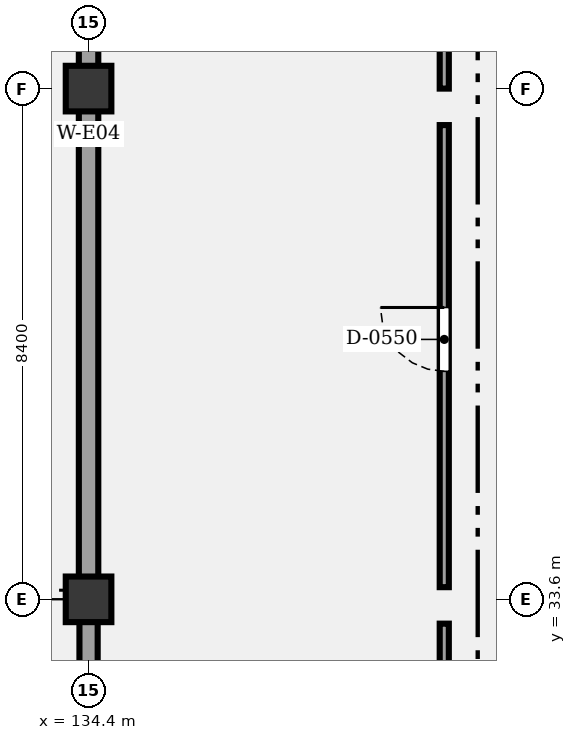
"""IFC4 building model, lengths in metres.
Left out: names, types, materials, properties, quantities, classifications, styles, units other than length and angle.
Written with IfcOpenShell. Run it as: python <this file> out.ifc"""

import sys

from ifc_helpers import new_model, si_unit, direction, frame, frame_2d, origin, origin_2d, place, context, subcontext, project, spatial, rectangle, extrude, element, fill, save


model = new_model("IFC4")
c1 = context("Model", 3, precision=1e-05, world=origin(), true_north=direction((0.0, 1.0)))
c2 = subcontext(c1, "Body", "Model", "MODEL_VIEW")
j1 = project(units=[si_unit("LENGTHUNIT", "METRE"), si_unit("PLANEANGLEUNIT", "RADIAN")], contexts=[c1])
p1 = place(None, origin())
s1 = spatial("IfcSite", under=j1, at=p1, CompositionType="ELEMENT")
p2 = place(p1, origin())
s2 = spatial("IfcBuilding", under=s1, at=p2, CompositionType="ELEMENT")
p3 = place(p2, frame((0.0, 0.0, 13.5)))
s3 = spatial("IfcBuildingStorey", under=s2, at=p3, CompositionType="ELEMENT", Elevation=13.5)
for number, where, z_axis, x_axis in (
    (1, (134.4, 33.6, 0.0), (0.0, 0.0, 1.0), (1.0, 0.0, 0.0)),
    (2, (134.4, 42.0, 0.0), (0.0, 0.0, 1.0), (1.0, 0.0, 0.0)),
):
    element("IfcColumn", number, at=place(p3, frame(where, z_axis=z_axis, x_axis=x_axis)), inside=s3, PredefinedType="COLUMN", context=c2, shape_type="SweptSolid", body=[
        extrude(rectangle(XDim=0.75, YDim=0.75, at=origin_2d()), origin(), (0.0, 0.0, 1.0), 4.3),
    ])
p4 = place(p3, frame((134.4, 16.8, 0.0), z_axis=(0.0, 0.0, 1.0), x_axis=(0.0, 1.0, 0.0)))
e3 = element("IfcWall", 3, at=p4, inside=s3, PredefinedType="SOLIDWALL", context=c2, shape_type="SweptSolid", body=[
    extrude(rectangle(XDim=16.8, YDim=0.3, at=frame_2d((8.4, 0.0))), origin(), (0.0, 0.0, 1.0), 3.49),
])
p5 = place(p4, frame((3.756, 0.0, 0.85)))
e4 = element("IfcOpeningElement", 4, at=p5, cuts=e3, PredefinedType="OPENING", context=c2, shape_type="SweptSolid", body=[
    extrude(rectangle(XDim=1.15, YDim=1.2, at=frame_2d((0.575, 0.6))), frame((0.0, 0.16, 0.0), z_axis=(0.0, -1.0, 0.0), x_axis=(1.0, 0.0, 0.0)), (0.0, 0.0, 1.0), 0.32),
])
p6 = place(p3, frame((134.4, 33.6, 0.0), z_axis=(0.0, 0.0, 1.0), x_axis=(0.0, 1.0, 0.0)))
e5 = element("IfcWall", 5, at=p6, inside=s3, PredefinedType="SOLIDWALL", context=c2, shape_type="SweptSolid", body=[
    extrude(rectangle(XDim=33.6, YDim=0.32, at=frame_2d((16.8, 0.0))), origin(), (0.0, 0.0, 1.0), 3.49),
])
p7 = place(p6, frame((10.336, 0.0, 0.85)))
e6 = element("IfcOpeningElement", 6, at=p7, cuts=e5, PredefinedType="OPENING", context=c2, shape_type="SweptSolid", body=[
    extrude(rectangle(XDim=1.3, YDim=1.2, at=frame_2d((0.65, 0.6))), frame((0.0, 0.17, 0.0), z_axis=(0.0, -1.0, 0.0), x_axis=(1.0, 0.0, 0.0)), (0.0, 0.0, 1.0), 0.34),
])
p8 = place(p3, frame((140.25, 25.6, 0.0), z_axis=(0.0, 0.0, 1.0), x_axis=(0.0, 1.0, 0.0)))
e7 = element("IfcWall", 7, at=p8, inside=s3, PredefinedType="PARTITIONING", context=c2, shape_type="SweptSolid", body=[
    extrude(rectangle(XDim=7.6, YDim=0.15, at=frame_2d((3.8, 0.0))), origin(), (0.0, 0.0, 1.0), 3.4),
])
p9 = place(p8, frame((3.2, 0.0, 0.0)))
e8 = element("IfcOpeningElement", 8, at=p9, cuts=e7, PredefinedType="OPENING", context=c2, shape_type="SweptSolid", body=[
    extrude(rectangle(XDim=1.05, YDim=2.1, at=frame_2d((0.525, 1.05))), frame((0.0, 0.085, 0.0), z_axis=(0.0, -1.0, 0.0), x_axis=(1.0, 0.0, 0.0)), (0.0, 0.0, 1.0), 0.17),
])
p10 = place(p3, frame((140.25, 33.8, 0.0), z_axis=(0.0, 0.0, 1.0), x_axis=(0.0, 1.0, 0.0)))
e9 = element("IfcWall", 9, at=p10, inside=s3, PredefinedType="PARTITIONING", context=c2, shape_type="SweptSolid", body=[
    extrude(rectangle(XDim=7.6, YDim=0.15, at=frame_2d((3.8, 0.0))), origin(), (0.0, 0.0, 1.0), 3.4),
])
p11 = place(p10, frame((3.55, 0.0, 0.0)))
e10 = element("IfcOpeningElement", 10, at=p11, cuts=e9, PredefinedType="OPENING", context=c2, shape_type="SweptSolid", body=[
    extrude(rectangle(XDim=1.05, YDim=2.1, at=frame_2d((0.525, 1.05))), frame((0.0, 0.085, 0.0), z_axis=(0.0, -1.0, 0.0), x_axis=(1.0, 0.0, 0.0)), (0.0, 0.0, 1.0), 0.17),
])
p12 = place(p3, frame((140.25, 42.0, 0.0), z_axis=(0.0, 0.0, 1.0), x_axis=(0.0, 1.0, 0.0)))
e11 = element("IfcWall", 11, at=p12, inside=s3, PredefinedType="PARTITIONING", context=c2, shape_type="SweptSolid", body=[
    extrude(rectangle(XDim=7.6, YDim=0.15, at=frame_2d((3.8, 0.0))), origin(), (0.0, 0.0, 1.0), 3.4),
])
p13 = place(p12, frame((3.55, 0.0, 0.0)))
e12 = element("IfcOpeningElement", 12, at=p13, cuts=e11, PredefinedType="OPENING", context=c2, shape_type="SweptSolid", body=[
    extrude(rectangle(XDim=1.05, YDim=2.1, at=frame_2d((0.525, 1.05))), frame((0.0, 0.085, 0.0), z_axis=(0.0, -1.0, 0.0), x_axis=(1.0, 0.0, 0.0)), (0.0, 0.0, 1.0), 0.17),
])
p14 = place(p11, origin())
e13 = element("IfcDoor", 13, at=p14, inside=s3, OperationType="SINGLE_SWING_RIGHT", PredefinedType="DOOR", context=c2, shape_type="SweptSolid", body=[
    extrude(rectangle(XDim=1.05, YDim=2.1, at=frame_2d((0.525, 1.05))), frame((0.0, 0.025, 0.0), z_axis=(0.0, -1.0, 0.0), x_axis=(1.0, 0.0, 0.0)), (0.0, 0.0, 1.0), 0.05),
])
fill(e10, e13)
save(model, sys.argv[1])
